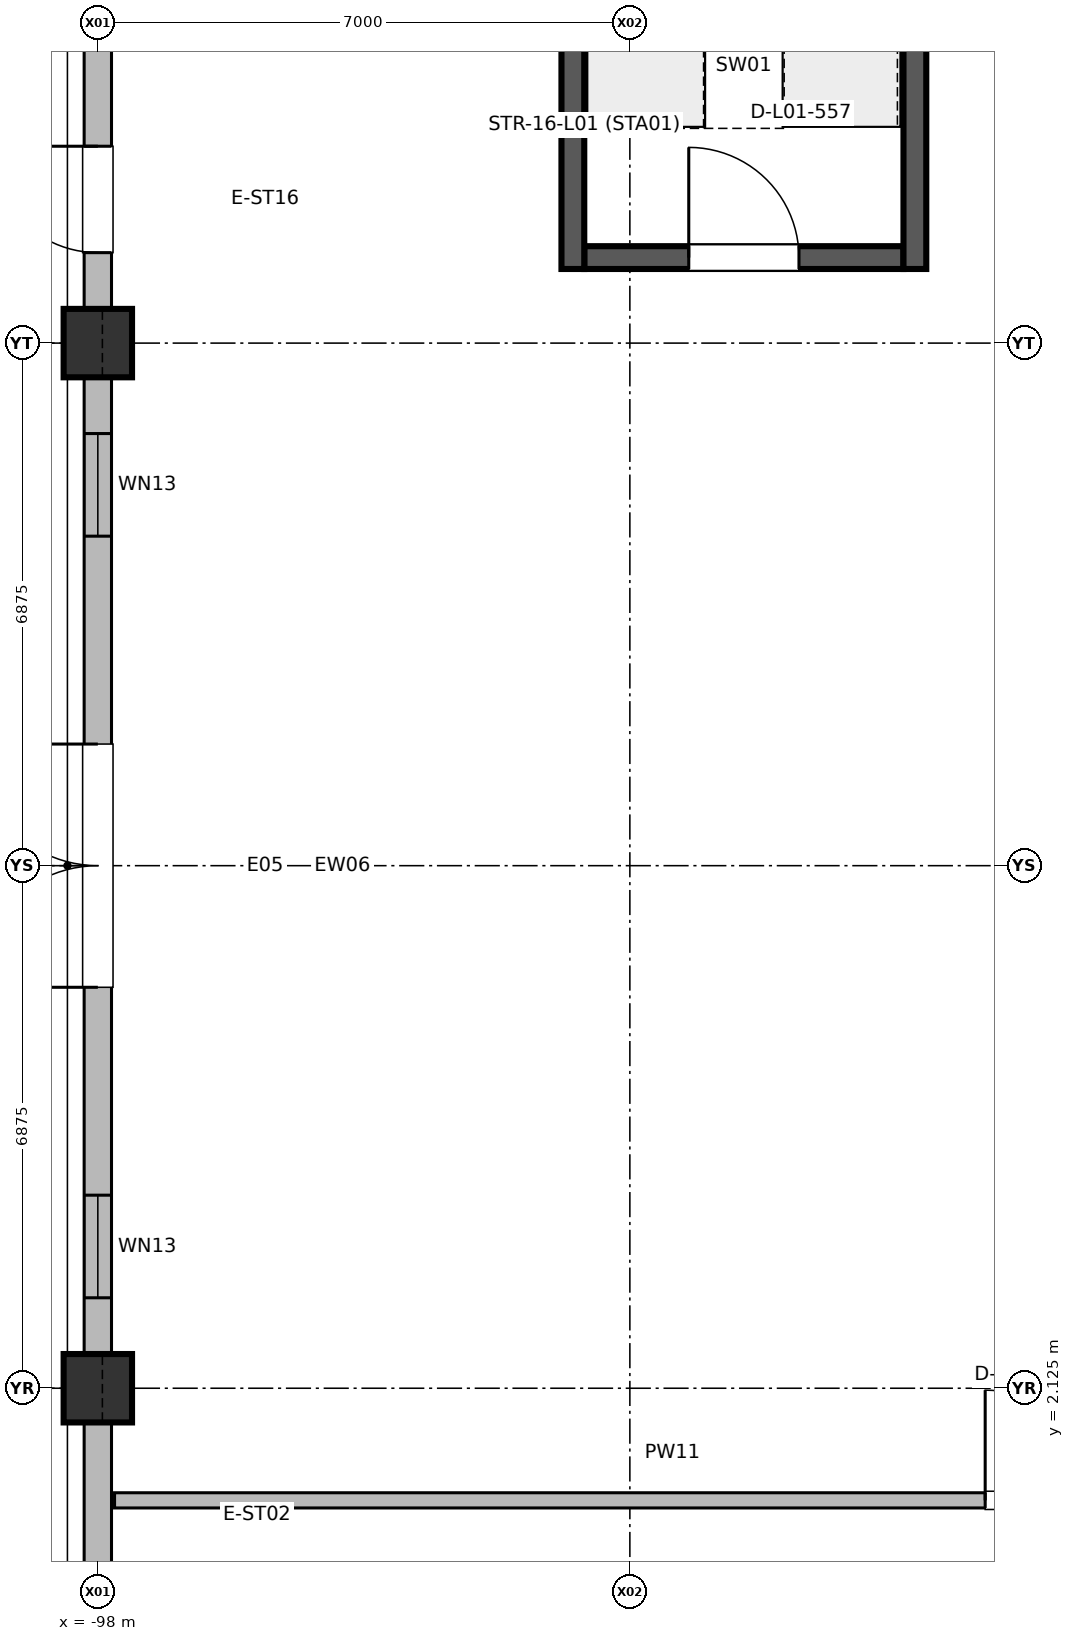
"""IFC4 building model, lengths in metres.
Left out: names, types, materials, properties, quantities, classifications, styles, units other than length and angle.
Written with IfcOpenShell. Run it as: python <this file> out.ifc"""

import sys

from ifc_helpers import new_model, si_unit, direction, frame, frame_2d, origin, origin_2d, place, context, subcontext, project, spatial, rectangle, extrude, element, fill, save


model = new_model("IFC4")
c1 = context("Model", 3, precision=1e-05, world=origin(), true_north=direction((0.0, 1.0)))
c2 = subcontext(c1, "Body", "Model", "MODEL_VIEW")
j1 = project(units=[si_unit("LENGTHUNIT", "METRE"), si_unit("PLANEANGLEUNIT", "RADIAN")], contexts=[c1])
p1 = place(None, origin())
s1 = spatial("IfcSite", under=j1, at=p1, CompositionType="ELEMENT")
p2 = place(p1, origin())
s2 = spatial("IfcBuilding", under=s1, at=p2, CompositionType="ELEMENT")
p3 = place(p2, origin())
s3 = spatial("IfcBuildingStorey", under=s2, at=p3, CompositionType="ELEMENT", Elevation=0.0)
for number, where, z_axis, x_axis in (
    (1, (-98.0, 2.125, 0.0), (0.0, 0.0, 1.0), (1.0, 0.0, 0.0)),
    (2, (-98.0, 15.875, 0.0), (0.0, 0.0, 1.0), (1.0, 0.0, 0.0)),
):
    element("IfcColumn", number, at=place(p3, frame(where, z_axis=z_axis, x_axis=x_axis)), inside=s3, PredefinedType="COLUMN", context=c2, shape_type="SweptSolid", body=[
        extrude(rectangle(XDim=0.9, YDim=0.9, at=origin_2d()), origin(), (0.0, 0.0, 1.0), 5.998),
    ])
p4 = place(p3, frame((-98.0, -11.185, 0.0), z_axis=(0.0, 0.0, 1.0), x_axis=(0.0, 1.0, 0.0)))
e3 = element("IfcWall", 3, at=p4, inside=s3, PredefinedType="SOLIDWALL", context=c2, shape_type="SweptSolid", body=[
    extrude(rectangle(XDim=12.87, YDim=0.36, at=frame_2d((6.435, 0.0))), origin(), (0.0, 0.0, 1.0), 4.655),
])
p5 = place(p4, frame((4.435, 0.0, 0.0)))
e4 = element("IfcOpeningElement", 4, at=p5, cuts=e3, PredefinedType="OPENING", context=c2, shape_type="SweptSolid", body=[
    extrude(rectangle(XDim=4.0, YDim=2.8, at=frame_2d((2.0, 1.4))), frame((0.0, 0.19, 0.0), z_axis=(0.0, -1.0, 0.0), x_axis=(1.0, 0.0, 0.0)), (0.0, 0.0, 1.0), 0.38),
])
p6 = place(p4, frame((0.75, 0.0, 1.0)))
e5 = element("IfcOpeningElement", 5, at=p6, cuts=e3, PredefinedType="OPENING", context=c2, shape_type="SweptSolid", body=[
    extrude(rectangle(XDim=2.7, YDim=2.1, at=frame_2d((1.35, 1.05))), frame((0.0, 0.19, 0.0), z_axis=(0.0, -1.0, 0.0), x_axis=(1.0, 0.0, 0.0)), (0.0, 0.0, 1.0), 0.38),
])
p7 = place(p4, frame((9.6, 0.0, 0.0)))
e6 = element("IfcOpeningElement", 6, at=p7, cuts=e3, PredefinedType="OPENING", context=c2, shape_type="SweptSolid", body=[
    extrude(rectangle(XDim=1.4, YDim=2.2, at=frame_2d((0.7, 1.1))), frame((0.0, 0.19, 0.0), z_axis=(0.0, -1.0, 0.0), x_axis=(1.0, 0.0, 0.0)), (0.0, 0.0, 1.0), 0.38),
])
p8 = place(p3, frame((-98.0, 2.565, 0.0), z_axis=(0.0, 0.0, 1.0), x_axis=(0.0, 1.0, 0.0)))
e7 = element("IfcWall", 7, at=p8, inside=s3, PredefinedType="SOLIDWALL", context=c2, shape_type="SweptSolid", body=[
    extrude(rectangle(XDim=12.87, YDim=0.36, at=frame_2d((6.435, 0.0))), origin(), (0.0, 0.0, 1.0), 4.655),
])
p9 = place(p8, frame((4.835, 0.0, 0.0)))
e8 = element("IfcOpeningElement", 8, at=p9, cuts=e7, PredefinedType="OPENING", context=c2, shape_type="SweptSolid", body=[
    extrude(rectangle(XDim=3.2, YDim=2.7, at=frame_2d((1.6, 1.35))), frame((0.0, 0.19, 0.0), z_axis=(0.0, -1.0, 0.0), x_axis=(1.0, 0.0, 0.0)), (0.0, 0.0, 1.0), 0.38),
])
p10 = place(p8, frame((0.75, 0.0, 1.0)))
e9 = element("IfcOpeningElement", 9, at=p10, cuts=e7, PredefinedType="OPENING", context=c2, shape_type="SweptSolid", body=[
    extrude(rectangle(XDim=1.35, YDim=1.75, at=frame_2d((0.675, 0.875))), frame((0.0, 0.19, 0.0), z_axis=(0.0, -1.0, 0.0), x_axis=(1.0, 0.0, 0.0)), (0.0, 0.0, 1.0), 0.38),
])
p11 = place(p8, frame((10.77, 0.0, 1.0)))
e10 = element("IfcOpeningElement", 10, at=p11, cuts=e7, PredefinedType="OPENING", context=c2, shape_type="SweptSolid", body=[
    extrude(rectangle(XDim=1.35, YDim=1.75, at=frame_2d((0.675, 0.875))), frame((0.0, 0.19, 0.0), z_axis=(0.0, -1.0, 0.0), x_axis=(1.0, 0.0, 0.0)), (0.0, 0.0, 1.0), 0.38),
])
p12 = place(p3, frame((-98.0, 16.315, 0.0), z_axis=(0.0, 0.0, 1.0), x_axis=(0.0, 1.0, 0.0)))
e11 = element("IfcWall", 11, at=p12, inside=s3, PredefinedType="SOLIDWALL", context=c2, shape_type="SweptSolid", body=[
    extrude(rectangle(XDim=12.87, YDim=0.36, at=frame_2d((6.435, 0.0))), origin(), (0.0, 0.0, 1.0), 3.955),
])
p13 = place(p12, frame((5.035, 0.0, 0.0)))
e12 = element("IfcOpeningElement", 12, at=p13, cuts=e11, PredefinedType="OPENING", context=c2, shape_type="SweptSolid", body=[
    extrude(rectangle(XDim=2.8, YDim=2.6, at=frame_2d((1.4, 1.3))), frame((0.0, 0.19, 0.0), z_axis=(0.0, -1.0, 0.0), x_axis=(1.0, 0.0, 0.0)), (0.0, 0.0, 1.0), 0.38),
])
p14 = place(p12, frame((0.75, 0.0, 0.0)))
e13 = element("IfcOpeningElement", 13, at=p14, cuts=e11, PredefinedType="OPENING", context=c2, shape_type="SweptSolid", body=[
    extrude(rectangle(XDim=1.4, YDim=2.2, at=frame_2d((0.7, 1.1))), frame((0.0, 0.19, 0.0), z_axis=(0.0, -1.0, 0.0), x_axis=(1.0, 0.0, 0.0)), (0.0, 0.0, 1.0), 0.38),
])
p15 = place(p12, frame((10.72, 0.0, 0.0)))
e14 = element("IfcOpeningElement", 14, at=p15, cuts=e11, PredefinedType="OPENING", context=c2, shape_type="SweptSolid", body=[
    extrude(rectangle(XDim=1.4, YDim=2.2, at=frame_2d((0.7, 1.1))), frame((0.0, 0.19, 0.0), z_axis=(0.0, -1.0, 0.0), x_axis=(1.0, 0.0, 0.0)), (0.0, 0.0, 1.0), 0.38),
])
p16 = place(p3, frame((-97.78, 0.65, 0.0), z_axis=(0.0, 0.0, 1.0), x_axis=(1.0, 0.0, 0.0)))
e15 = element("IfcWall", 15, at=p16, inside=s3, PredefinedType="PARTITIONING", context=c2, shape_type="SweptSolid", body=[
    extrude(rectangle(XDim=14.68, YDim=0.2, at=frame_2d((7.34, 0.0))), origin(), (0.0, 0.0, 1.0), 5.02),
])
p17 = place(p16, frame((11.455, 0.0, 0.0)))
e16 = element("IfcOpeningElement", 16, at=p17, cuts=e15, PredefinedType="OPENING", context=c2, shape_type="SweptSolid", body=[
    extrude(rectangle(XDim=1.45, YDim=2.2, at=frame_2d((0.725, 1.1))), frame((0.0, 0.11, 0.0), z_axis=(0.0, -1.0, 0.0), x_axis=(1.0, 0.0, 0.0)), (0.0, 0.0, 1.0), 0.22),
])
p18 = place(p3, frame((-91.6, 17.0, 0.0), z_axis=(0.0, 0.0, 1.0), x_axis=(1.0, 0.0, 0.0)))
e17 = element("IfcWall", 17, at=p18, inside=s3, PredefinedType="SHEAR", context=c2, shape_type="SweptSolid", body=[
    extrude(rectangle(XDim=4.2, YDim=0.3, at=frame_2d((2.1, 0.0))), origin(), (0.0, 0.0, 1.0), 5.78),
])
p19 = place(p18, frame((1.375, 0.0, 0.0)))
e18 = element("IfcOpeningElement", 18, at=p19, cuts=e17, PredefinedType="OPENING", context=c2, shape_type="SweptSolid", body=[
    extrude(rectangle(XDim=1.45, YDim=2.2, at=frame_2d((0.725, 1.1))), frame((0.0, 0.16, 0.0), z_axis=(0.0, -1.0, 0.0), x_axis=(1.0, 0.0, 0.0)), (0.0, 0.0, 1.0), 0.32),
])
for number, where, z_axis, x_axis in (
    (19, (-91.75, 16.85, 0.0), (0.0, 0.0, 1.0), (0.0, 1.0, 0.0)),
    (20, (-87.25, 16.85, 0.0), (0.0, 0.0, 1.0), (0.0, 1.0, 0.0)),
):
    element("IfcWall", number, at=place(p3, frame(where, z_axis=z_axis, x_axis=x_axis)), inside=s3, PredefinedType="SHEAR", context=c2, shape_type="SweptSolid", body=[
        extrude(rectangle(XDim=8.45, YDim=0.3, at=frame_2d((4.225, 0.0))), origin(), (0.0, 0.0, 1.0), 5.78),
    ])
p20 = place(p9, origin())
e21 = element("IfcDoor", 21, at=p20, inside=s3, OperationType="DOUBLE_DOOR_SINGLE_SWING", PredefinedType="DOOR", context=c2, shape_type="SweptSolid", body=[
    extrude(rectangle(XDim=3.2, YDim=2.7, at=frame_2d((1.6, 1.35))), frame((0.0, 0.025, 0.0), z_axis=(0.0, -1.0, 0.0), x_axis=(1.0, 0.0, 0.0)), (0.0, 0.0, 1.0), 0.05),
])
fill(e8, e21)
p21 = place(p10, origin())
e22 = element("IfcWindow", 22, at=p21, inside=s3, PartitioningType="SINGLE_PANEL", PredefinedType="WINDOW", context=c2, shape_type="SweptSolid", body=[
    extrude(rectangle(XDim=1.35, YDim=1.75, at=frame_2d((0.675, 0.875))), frame((0.0, 0.03, 0.0), z_axis=(0.0, -1.0, 0.0), x_axis=(1.0, 0.0, 0.0)), (0.0, 0.0, 1.0), 0.06),
])
fill(e9, e22)
p22 = place(p11, origin())
e23 = element("IfcWindow", 23, at=p22, inside=s3, PartitioningType="SINGLE_PANEL", PredefinedType="WINDOW", context=c2, shape_type="SweptSolid", body=[
    extrude(rectangle(XDim=1.35, YDim=1.75, at=frame_2d((0.675, 0.875))), frame((0.0, 0.03, 0.0), z_axis=(0.0, -1.0, 0.0), x_axis=(1.0, 0.0, 0.0)), (0.0, 0.0, 1.0), 0.06),
])
fill(e10, e23)
p23 = place(p14, origin())
e24 = element("IfcDoor", 24, at=p23, inside=s3, OperationType="SINGLE_SWING_RIGHT", PredefinedType="DOOR", context=c2, shape_type="SweptSolid", body=[
    extrude(rectangle(XDim=1.4, YDim=2.2, at=frame_2d((0.7, 1.1))), frame((0.0, 0.025, 0.0), z_axis=(0.0, -1.0, 0.0), x_axis=(1.0, 0.0, 0.0)), (0.0, 0.0, 1.0), 0.05),
])
fill(e13, e24)
p24 = place(p17, origin())
e25 = element("IfcDoor", 25, at=p24, inside=s3, OperationType="SINGLE_SWING_LEFT", PredefinedType="DOOR", context=c2, shape_type="SweptSolid", body=[
    extrude(rectangle(XDim=1.45, YDim=2.2, at=frame_2d((0.725, 1.1))), frame((0.0, 0.025, 0.0), z_axis=(0.0, -1.0, 0.0), x_axis=(1.0, 0.0, 0.0)), (0.0, 0.0, 1.0), 0.05),
])
fill(e16, e25)
p25 = place(p19, origin())
e26 = element("IfcDoor", 26, at=p25, inside=s3, OperationType="SINGLE_SWING_LEFT", PredefinedType="DOOR", context=c2, shape_type="SweptSolid", body=[
    extrude(rectangle(XDim=1.45, YDim=2.2, at=frame_2d((0.725, 1.1))), frame((0.0, 0.025, 0.0), z_axis=(0.0, -1.0, 0.0), x_axis=(1.0, 0.0, 0.0)), (0.0, 0.0, 1.0), 0.05),
])
fill(e18, e26)
save(model, sys.argv[1])
